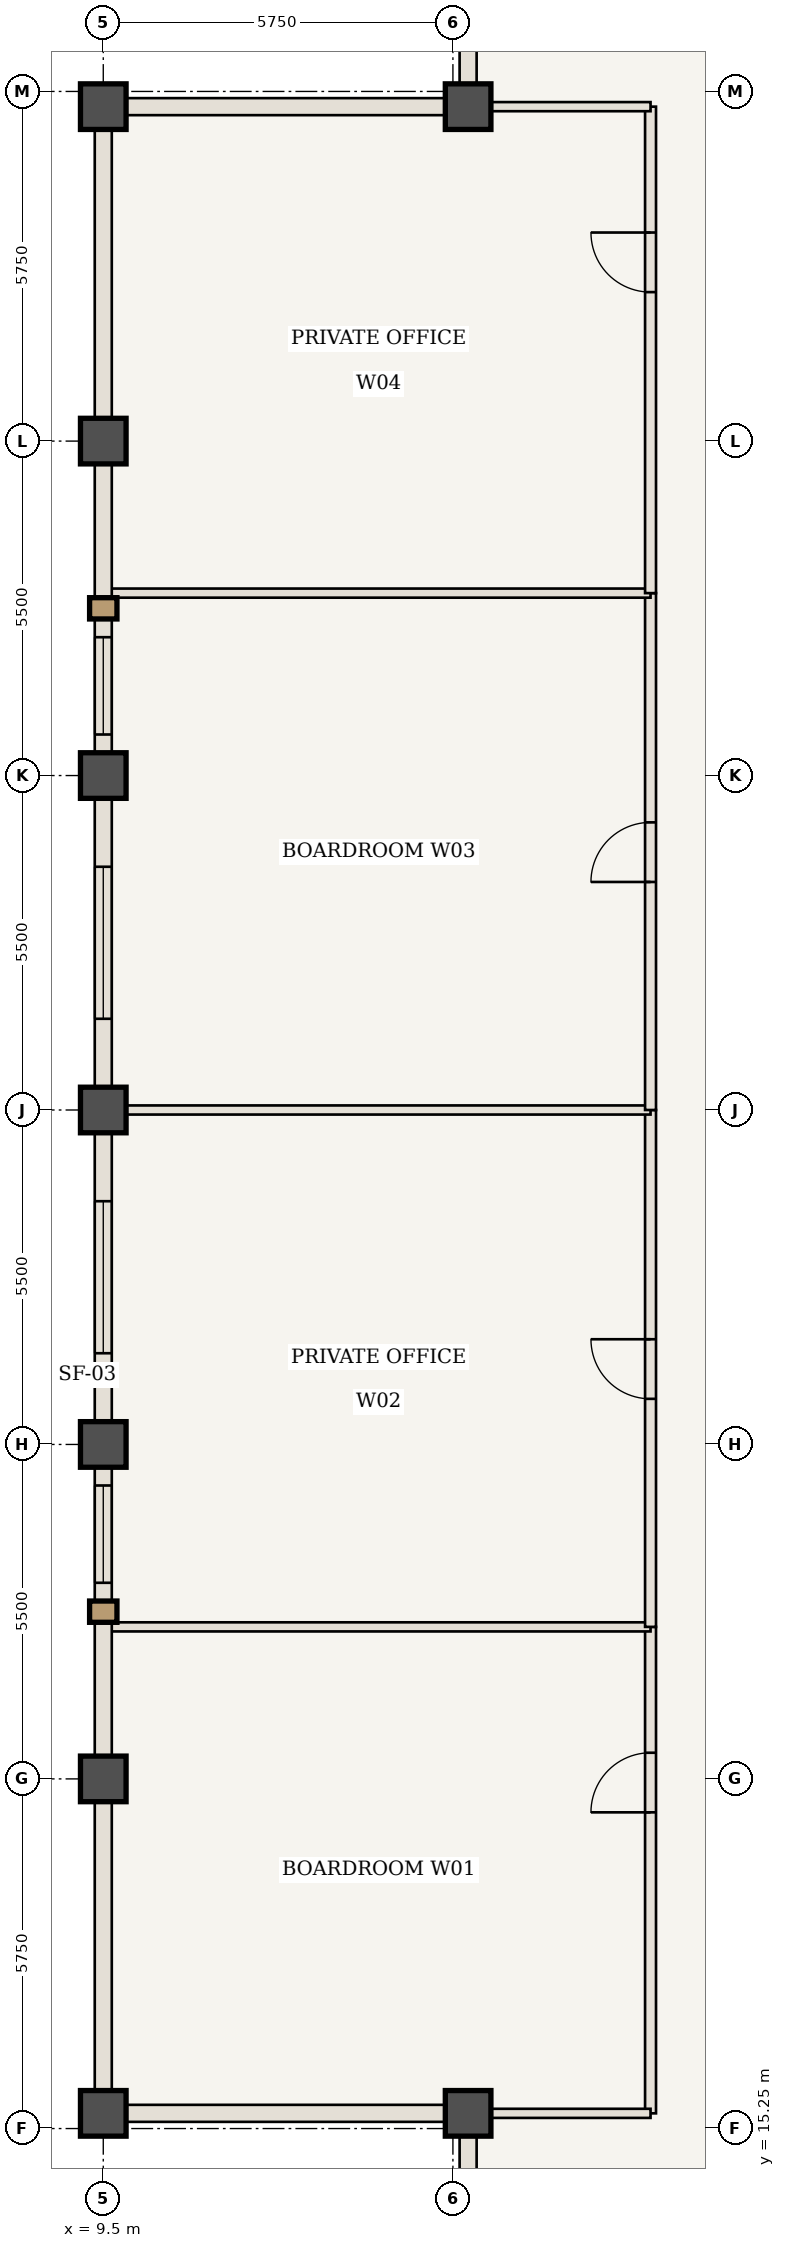
"""IFC4 building model, lengths in metres.
Left out: names, types, materials, properties, quantities, classifications, styles, units other than length and angle.
Written with IfcOpenShell. Run it as: python <this file> out.ifc"""

import sys

from ifc_helpers import new_model, si_unit, direction, frame, frame_2d, origin, origin_2d, place, context, subcontext, project, spatial, rectangle, extrude, element, fill, save


model = new_model("IFC4")
c1 = context("Model", 3, precision=1e-05, world=origin(), true_north=direction((0.0, 1.0)))
c2 = subcontext(c1, "Body", "Model", "MODEL_VIEW")
j1 = project(units=[si_unit("LENGTHUNIT", "METRE"), si_unit("PLANEANGLEUNIT", "RADIAN")], contexts=[c1])
p1 = place(None, origin())
s1 = spatial("IfcSite", under=j1, at=p1, CompositionType="ELEMENT")
p2 = place(p1, origin())
s2 = spatial("IfcBuilding", under=s1, at=p2, CompositionType="ELEMENT")
p3 = place(p2, frame((0.0, 0.0, 269.85)))
s3 = spatial("IfcBuildingStorey", under=s2, at=p3, CompositionType="ELEMENT", Elevation=269.85)
for number, where, z_axis, x_axis in (
    (1, (15.5, 15.5, 0.0), (0.0, 0.0, 1.0), (1.0, 0.0, 0.0)),
    (2, (9.5, 15.5, 0.0), (0.0, 0.0, 1.0), (1.0, 0.0, 0.0)),
    (3, (15.5, 48.5, 0.0), (0.0, 0.0, 1.0), (1.0, 0.0, 0.0)),
    (4, (9.5, 48.5, 0.0), (0.0, 0.0, 1.0), (1.0, 0.0, 0.0)),
    (5, (9.5, 21.0, 0.0), (0.0, 0.0, 1.0), (1.0, 0.0, 0.0)),
    (6, (9.5, 26.5, 0.0), (0.0, 0.0, 1.0), (1.0, 0.0, 0.0)),
    (7, (9.5, 32.0, 0.0), (0.0, 0.0, 1.0), (1.0, 0.0, 0.0)),
    (8, (9.5, 37.5, 0.0), (0.0, 0.0, 1.0), (1.0, 0.0, 0.0)),
    (9, (9.5, 43.0, 0.0), (0.0, 0.0, 1.0), (1.0, 0.0, 0.0)),
):
    element("IfcColumn", number, at=place(p3, frame(where, z_axis=z_axis, x_axis=x_axis)), inside=s3, PredefinedType="COLUMN", context=c2, shape_type="SweptSolid", body=[
        extrude(rectangle(XDim=0.75, YDim=0.75, at=origin_2d()), origin(), (0.0, 0.0, 1.0), 3.85),
    ])
p4 = place(p3, frame((18.5, 15.5, 0.0), z_axis=(0.0, 0.0, 1.0), x_axis=(0.0, 1.0, 0.0)))
e10 = element("IfcWall", 10, at=p4, inside=s3, PredefinedType="STANDARD", context=c2, shape_type="SweptSolid", body=[
    extrude(rectangle(XDim=8.0, YDim=0.18, at=frame_2d((4.0, 0.0))), origin(), (0.0, 0.0, 1.0), 3.685),
])
p5 = place(p4, frame((4.95, 0.0, 0.0)))
e11 = element("IfcOpeningElement", 11, at=p5, cuts=e10, PredefinedType="OPENING", context=c2, shape_type="SweptSolid", body=[
    extrude(rectangle(XDim=0.98, YDim=2.2, at=frame_2d((0.49, 1.1))), frame((0.0, 0.1, 0.0), z_axis=(0.0, -1.0, 0.0), x_axis=(1.0, 0.0, 0.0)), (0.0, 0.0, 1.0), 0.2),
])
p6 = place(p3, frame((9.56, 23.5, 0.0), z_axis=(0.0, 0.0, 1.0), x_axis=(1.0, 0.0, 0.0)))
e12 = element("IfcWall", 12, at=p6, inside=s3, PredefinedType="STANDARD", context=c2, shape_type="SweptSolid", body=[
    extrude(rectangle(XDim=8.94, YDim=0.15, at=frame_2d((4.47, 0.0))), origin(), (0.0, 0.0, 1.0), 3.685),
])
p7 = place(p3, frame((18.5, 23.5, 0.0), z_axis=(0.0, 0.0, 1.0), x_axis=(0.0, 1.0, 0.0)))
e13 = element("IfcWall", 13, at=p7, inside=s3, PredefinedType="STANDARD", context=c2, shape_type="SweptSolid", body=[
    extrude(rectangle(XDim=8.5, YDim=0.18, at=frame_2d((4.25, 0.0))), origin(), (0.0, 0.0, 1.0), 3.685),
])
p8 = place(p7, frame((3.75, 0.0, 0.0)))
e14 = element("IfcOpeningElement", 14, at=p8, cuts=e13, PredefinedType="OPENING", context=c2, shape_type="SweptSolid", body=[
    extrude(rectangle(XDim=0.98, YDim=2.2, at=frame_2d((0.49, 1.1))), frame((0.0, 0.1, 0.0), z_axis=(0.0, -1.0, 0.0), x_axis=(1.0, 0.0, 0.0)), (0.0, 0.0, 1.0), 0.2),
])
p9 = place(p3, frame((9.56, 32.0, 0.0), z_axis=(0.0, 0.0, 1.0), x_axis=(1.0, 0.0, 0.0)))
e15 = element("IfcWall", 15, at=p9, inside=s3, PredefinedType="STANDARD", context=c2, shape_type="SweptSolid", body=[
    extrude(rectangle(XDim=8.94, YDim=0.15, at=frame_2d((4.47, 0.0))), origin(), (0.0, 0.0, 1.0), 3.14),
])
p10 = place(p3, frame((18.5, 32.0, 0.0), z_axis=(0.0, 0.0, 1.0), x_axis=(0.0, 1.0, 0.0)))
e16 = element("IfcWall", 16, at=p10, inside=s3, PredefinedType="STANDARD", context=c2, shape_type="SweptSolid", body=[
    extrude(rectangle(XDim=8.5, YDim=0.18, at=frame_2d((4.25, 0.0))), origin(), (0.0, 0.0, 1.0), 3.685),
])
p11 = place(p10, frame((3.75, 0.0, 0.0)))
e17 = element("IfcOpeningElement", 17, at=p11, cuts=e16, PredefinedType="OPENING", context=c2, shape_type="SweptSolid", body=[
    extrude(rectangle(XDim=0.98, YDim=2.2, at=frame_2d((0.49, 1.1))), frame((0.0, 0.1, 0.0), z_axis=(0.0, -1.0, 0.0), x_axis=(1.0, 0.0, 0.0)), (0.0, 0.0, 1.0), 0.2),
])
p12 = place(p3, frame((9.56, 40.5, 0.0), z_axis=(0.0, 0.0, 1.0), x_axis=(1.0, 0.0, 0.0)))
e18 = element("IfcWall", 18, at=p12, inside=s3, PredefinedType="STANDARD", context=c2, shape_type="SweptSolid", body=[
    extrude(rectangle(XDim=8.94, YDim=0.15, at=frame_2d((4.47, 0.0))), origin(), (0.0, 0.0, 1.0), 3.685),
])
p13 = place(p3, frame((18.5, 40.5, 0.0), z_axis=(0.0, 0.0, 1.0), x_axis=(0.0, 1.0, 0.0)))
e19 = element("IfcWall", 19, at=p13, inside=s3, PredefinedType="STANDARD", context=c2, shape_type="SweptSolid", body=[
    extrude(rectangle(XDim=8.0, YDim=0.18, at=frame_2d((4.0, 0.0))), origin(), (0.0, 0.0, 1.0), 3.685),
])
p14 = place(p13, frame((4.95, 0.0, 0.0)))
e20 = element("IfcOpeningElement", 20, at=p14, cuts=e19, PredefinedType="OPENING", context=c2, shape_type="SweptSolid", body=[
    extrude(rectangle(XDim=0.98, YDim=2.2, at=frame_2d((0.49, 1.1))), frame((0.0, 0.1, 0.0), z_axis=(0.0, -1.0, 0.0), x_axis=(1.0, 0.0, 0.0)), (0.0, 0.0, 1.0), 0.2),
])
for number, where, z_axis, x_axis in (
    (21, (15.5, 15.5, 0.0), (0.0, 0.0, 1.0), (1.0, 0.0, 0.0)),
    (22, (15.5, 48.5, 0.0), (0.0, 0.0, 1.0), (1.0, 0.0, 0.0)),
):
    element("IfcWall", number, at=place(p3, frame(where, z_axis=z_axis, x_axis=x_axis)), inside=s3, PredefinedType="STANDARD", context=c2, shape_type="SweptSolid", body=[
        extrude(rectangle(XDim=3.0, YDim=0.15, at=frame_2d((1.5, 0.0))), origin(), (0.0, 0.0, 1.0), 3.685),
    ])
p15 = place(p3, frame((9.5, 15.5, 0.0), z_axis=(0.0, 0.0, 1.0), x_axis=(0.0, 1.0, 0.0)))
e23 = element("IfcWall", 23, at=p15, inside=s3, PredefinedType="USERDEFINED", context=c2, shape_type="SweptSolid", body=[
    extrude(rectangle(XDim=5.5, YDim=0.28, at=frame_2d((2.75, 0.0))), origin(), (0.0, 0.0, 1.0), 2.985),
])
p16 = place(p3, frame((9.5, 21.0, 0.0), z_axis=(0.0, 0.0, 1.0), x_axis=(0.0, 1.0, 0.0)))
e24 = element("IfcWall", 24, at=p16, inside=s3, PredefinedType="USERDEFINED", context=c2, shape_type="SweptSolid", body=[
    extrude(rectangle(XDim=5.5, YDim=0.28, at=frame_2d((2.75, 0.0))), origin(), (0.0, 0.0, 1.0), 2.985),
])
p17 = place(p16, frame((3.225, 0.0, 0.85)))
e25 = element("IfcOpeningElement", 25, at=p17, cuts=e24, PredefinedType="OPENING", context=c2, shape_type="SweptSolid", body=[
    extrude(rectangle(XDim=1.6, YDim=1.935, at=frame_2d((0.8, 0.968))), frame((0.0, 0.15, 0.0), z_axis=(0.0, -1.0, 0.0), x_axis=(1.0, 0.0, 0.0)), (0.0, 0.0, 1.0), 0.3),
])
p18 = place(p3, frame((9.5, 26.5, 0.0), z_axis=(0.0, 0.0, 1.0), x_axis=(0.0, 1.0, 0.0)))
e26 = element("IfcWall", 26, at=p18, inside=s3, PredefinedType="USERDEFINED", context=c2, shape_type="SweptSolid", body=[
    extrude(rectangle(XDim=5.5, YDim=0.28, at=frame_2d((2.75, 0.0))), origin(), (0.0, 0.0, 1.0), 2.985),
])
p19 = place(p18, frame((1.5, 0.0, 0.85)))
e27 = element("IfcOpeningElement", 27, at=p19, cuts=e26, PredefinedType="OPENING", context=c2, shape_type="SweptSolid", body=[
    extrude(rectangle(XDim=2.5, YDim=1.935, at=frame_2d((1.25, 0.968))), frame((0.0, 0.15, 0.0), z_axis=(0.0, -1.0, 0.0), x_axis=(1.0, 0.0, 0.0)), (0.0, 0.0, 1.0), 0.3),
])
p20 = place(p3, frame((9.5, 32.0, 0.0), z_axis=(0.0, 0.0, 1.0), x_axis=(0.0, 1.0, 0.0)))
e28 = element("IfcWall", 28, at=p20, inside=s3, PredefinedType="USERDEFINED", context=c2, shape_type="SweptSolid", body=[
    extrude(rectangle(XDim=5.5, YDim=0.28, at=frame_2d((2.75, 0.0))), origin(), (0.0, 0.0, 1.0), 2.985),
])
p21 = place(p20, frame((1.5, 0.0, 0.85)))
e29 = element("IfcOpeningElement", 29, at=p21, cuts=e28, PredefinedType="OPENING", context=c2, shape_type="SweptSolid", body=[
    extrude(rectangle(XDim=2.5, YDim=1.935, at=frame_2d((1.25, 0.968))), frame((0.0, 0.15, 0.0), z_axis=(0.0, -1.0, 0.0), x_axis=(1.0, 0.0, 0.0)), (0.0, 0.0, 1.0), 0.3),
])
p22 = place(p3, frame((9.5, 37.5, 0.0), z_axis=(0.0, 0.0, 1.0), x_axis=(0.0, 1.0, 0.0)))
e30 = element("IfcWall", 30, at=p22, inside=s3, PredefinedType="USERDEFINED", context=c2, shape_type="SweptSolid", body=[
    extrude(rectangle(XDim=5.5, YDim=0.28, at=frame_2d((2.75, 0.0))), origin(), (0.0, 0.0, 1.0), 2.985),
])
p23 = place(p22, frame((0.675, 0.0, 0.85)))
e31 = element("IfcOpeningElement", 31, at=p23, cuts=e30, PredefinedType="OPENING", context=c2, shape_type="SweptSolid", body=[
    extrude(rectangle(XDim=1.6, YDim=1.935, at=frame_2d((0.8, 0.968))), frame((0.0, 0.15, 0.0), z_axis=(0.0, -1.0, 0.0), x_axis=(1.0, 0.0, 0.0)), (0.0, 0.0, 1.0), 0.3),
])
p24 = place(p3, frame((9.5, 43.0, 0.0), z_axis=(0.0, 0.0, 1.0), x_axis=(0.0, 1.0, 0.0)))
e32 = element("IfcWall", 32, at=p24, inside=s3, PredefinedType="USERDEFINED", context=c2, shape_type="SweptSolid", body=[
    extrude(rectangle(XDim=5.5, YDim=0.28, at=frame_2d((2.75, 0.0))), origin(), (0.0, 0.0, 1.0), 2.985),
])
for number, where, z_axis, x_axis in (
    (33, (15.5, 9.5, 0.0), (0.0, 0.0, 1.0), (0.0, 1.0, 0.0)),
    (34, (15.5, 15.5, 0.0), (0.0, 0.0, 1.0), (-1.0, 0.0, 0.0)),
    (35, (15.5, 48.5, 0.0), (0.0, 0.0, 1.0), (0.0, 1.0, 0.0)),
    (36, (9.5, 48.5, 0.0), (0.0, 0.0, 1.0), (1.0, 0.0, 0.0)),
):
    element("IfcWall", number, at=place(p3, frame(where, z_axis=z_axis, x_axis=x_axis)), inside=s3, PredefinedType="USERDEFINED", context=c2, shape_type="SweptSolid", body=[
        extrude(rectangle(XDim=6.0, YDim=0.28, at=frame_2d((3.0, 0.0))), origin(), (0.0, 0.0, 1.0), 2.985),
    ])
p25 = place(p5, origin())
e37 = element("IfcDoor", 37, at=p25, inside=s3, OperationType="SINGLE_SWING_LEFT", PredefinedType="DOOR", context=c2, shape_type="SweptSolid", body=[
    extrude(rectangle(XDim=0.98, YDim=2.2, at=frame_2d((0.49, 1.1))), frame((0.0, 0.025, 0.0), z_axis=(0.0, -1.0, 0.0), x_axis=(1.0, 0.0, 0.0)), (0.0, 0.0, 1.0), 0.05),
])
fill(e11, e37)
p26 = place(p8, origin())
e38 = element("IfcDoor", 38, at=p26, inside=s3, OperationType="SINGLE_SWING_RIGHT", PredefinedType="DOOR", context=c2, shape_type="SweptSolid", body=[
    extrude(rectangle(XDim=0.98, YDim=2.2, at=frame_2d((0.49, 1.1))), frame((0.0, 0.025, 0.0), z_axis=(0.0, -1.0, 0.0), x_axis=(1.0, 0.0, 0.0)), (0.0, 0.0, 1.0), 0.05),
])
fill(e14, e38)
p27 = place(p11, origin())
e39 = element("IfcDoor", 39, at=p27, inside=s3, OperationType="SINGLE_SWING_LEFT", PredefinedType="DOOR", context=c2, shape_type="SweptSolid", body=[
    extrude(rectangle(XDim=0.98, YDim=2.2, at=frame_2d((0.49, 1.1))), frame((0.0, 0.025, 0.0), z_axis=(0.0, -1.0, 0.0), x_axis=(1.0, 0.0, 0.0)), (0.0, 0.0, 1.0), 0.05),
])
fill(e17, e39)
p28 = place(p14, origin())
e40 = element("IfcDoor", 40, at=p28, inside=s3, OperationType="SINGLE_SWING_RIGHT", PredefinedType="DOOR", context=c2, shape_type="SweptSolid", body=[
    extrude(rectangle(XDim=0.98, YDim=2.2, at=frame_2d((0.49, 1.1))), frame((0.0, 0.025, 0.0), z_axis=(0.0, -1.0, 0.0), x_axis=(1.0, 0.0, 0.0)), (0.0, 0.0, 1.0), 0.05),
])
fill(e20, e40)
p29 = place(p17, origin())
e41 = element("IfcWindow", 41, at=p29, inside=s3, PartitioningType="SINGLE_PANEL", PredefinedType="WINDOW", context=c2, shape_type="SweptSolid", body=[
    extrude(rectangle(XDim=1.6, YDim=1.935, at=frame_2d((0.8, 0.968))), frame((0.0, 0.03, 0.0), z_axis=(0.0, -1.0, 0.0), x_axis=(1.0, 0.0, 0.0)), (0.0, 0.0, 1.0), 0.06),
])
fill(e25, e41)
p30 = place(p19, origin())
e42 = element("IfcWindow", 42, at=p30, inside=s3, PartitioningType="SINGLE_PANEL", PredefinedType="WINDOW", context=c2, shape_type="SweptSolid", body=[
    extrude(rectangle(XDim=2.5, YDim=1.935, at=frame_2d((1.25, 0.968))), frame((0.0, 0.03, 0.0), z_axis=(0.0, -1.0, 0.0), x_axis=(1.0, 0.0, 0.0)), (0.0, 0.0, 1.0), 0.06),
])
fill(e27, e42)
p31 = place(p21, origin())
e43 = element("IfcWindow", 43, at=p31, inside=s3, PartitioningType="SINGLE_PANEL", PredefinedType="WINDOW", context=c2, shape_type="SweptSolid", body=[
    extrude(rectangle(XDim=2.5, YDim=1.935, at=frame_2d((1.25, 0.968))), frame((0.0, 0.03, 0.0), z_axis=(0.0, -1.0, 0.0), x_axis=(1.0, 0.0, 0.0)), (0.0, 0.0, 1.0), 0.06),
])
fill(e29, e43)
p32 = place(p23, origin())
e44 = element("IfcWindow", 44, at=p32, inside=s3, PartitioningType="SINGLE_PANEL", PredefinedType="WINDOW", context=c2, shape_type="SweptSolid", body=[
    extrude(rectangle(XDim=1.6, YDim=1.935, at=frame_2d((0.8, 0.968))), frame((0.0, 0.03, 0.0), z_axis=(0.0, -1.0, 0.0), x_axis=(1.0, 0.0, 0.0)), (0.0, 0.0, 1.0), 0.06),
])
fill(e31, e44)
save(model, sys.argv[1])
